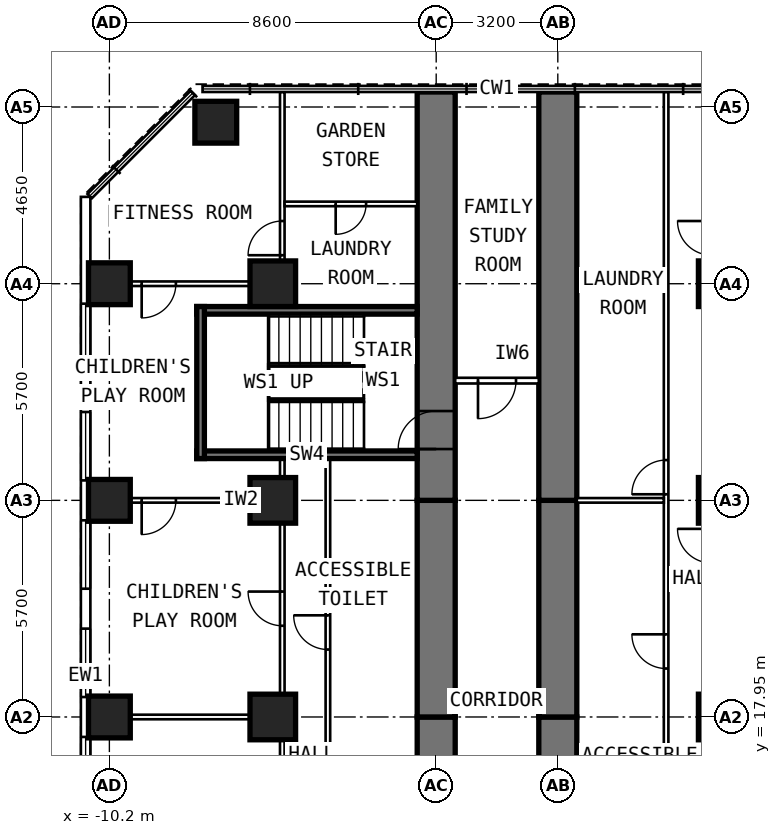
"""IFC4 building model, lengths in metres.
Left out: names, types, materials, properties, quantities, classifications, styles, units other than length and angle.
Written with IfcOpenShell. Run it as: python <this file> out.ifc"""

import sys

from ifc_helpers import new_model, si_unit, direction, frame, frame_2d, origin, origin_2d, place, context, subcontext, project, spatial, rectangle, extrude, element, fill, save


model = new_model("IFC4")
c1 = context("Model", 3, precision=1e-05, world=origin(), true_north=direction((0.0, 1.0)))
c2 = subcontext(c1, "Body", "Model", "MODEL_VIEW")
j1 = project(units=[si_unit("LENGTHUNIT", "METRE"), si_unit("PLANEANGLEUNIT", "RADIAN")], contexts=[c1])
p1 = place(None, origin())
s1 = spatial("IfcSite", under=j1, at=p1, CompositionType="ELEMENT")
p2 = place(p1, origin())
s2 = spatial("IfcBuilding", under=s1, at=p2, CompositionType="ELEMENT")
p3 = place(p2, frame((0.0, 0.0, 25.2)))
s3 = spatial("IfcBuildingStorey", under=s2, at=p3, CompositionType="ELEMENT", Elevation=25.2)
for number, where, z_axis, x_axis in (
    (1, (-10.2, 17.95, 0.0), (0.0, 0.0, 1.0), (0.0, 1.0, 0.0)),
    (2, (-10.2, 23.65, 0.0), (0.0, 0.0, 1.0), (0.0, 1.0, 0.0)),
    (3, (-10.2, 29.35, 0.0), (0.0, 0.0, 1.0), (0.0, 1.0, 0.0)),
    (4, (-7.4, 33.6, 0.0), (0.0, 0.0, 1.0), (0.0, 1.0, 0.0)),
):
    element("IfcColumn", number, at=place(p3, frame(where, z_axis=z_axis, x_axis=x_axis)), inside=s3, PredefinedType="COLUMN", context=c2, shape_type="SweptSolid", body=[
        extrude(rectangle(XDim=1.1, YDim=1.1, at=origin_2d()), origin(), (0.0, 0.0, 1.0), 3.6),
    ])
for number, where, z_axis, x_axis in (
    (5, (-5.9, 17.95, 0.0), (0.0, 0.0, 1.0), (0.0, 1.0, 0.0)),
    (6, (-5.9, 23.65, 0.0), (0.0, 0.0, 1.0), (0.0, 1.0, 0.0)),
    (7, (-5.9, 29.35, 0.0), (0.0, 0.0, 1.0), (0.0, 1.0, 0.0)),
    (8, (5.9, 17.95, 0.0), (0.0, 0.0, 1.0), (0.0, 1.0, 0.0)),
    (9, (5.9, 23.65, 0.0), (0.0, 0.0, 1.0), (0.0, 1.0, 0.0)),
    (10, (5.9, 29.35, 0.0), (0.0, 0.0, 1.0), (0.0, 1.0, 0.0)),
):
    element("IfcColumn", number, at=place(p3, frame(where, z_axis=z_axis, x_axis=x_axis)), inside=s3, PredefinedType="COLUMN", context=c2, shape_type="SweptSolid", body=[
        extrude(rectangle(XDim=1.2, YDim=1.2, at=origin_2d()), origin(), (0.0, 0.0, 1.0), 3.6),
    ])
p4 = place(p3, frame((-1.6, 9.6, 0.0), z_axis=(0.0, 0.0, 1.0), x_axis=(0.0, 1.0, 0.0)))
e11 = element("IfcWall", 11, at=p4, inside=s3, PredefinedType="SHEAR", context=c2, shape_type="SweptSolid", body=[
    extrude(rectangle(XDim=8.35, YDim=1.0, at=frame_2d((4.175, 0.0))), origin(), (0.0, 0.0, 1.0), 3.6),
])
p5 = place(p4, frame((1.3, 0.0, 0.0)))
e12 = element("IfcOpeningElement", 12, at=p5, cuts=e11, PredefinedType="OPENING", context=c2, shape_type="SweptSolid", body=[
    extrude(rectangle(XDim=1.0, YDim=2.1, at=frame_2d((0.5, 1.05))), frame((0.0, 0.512, 0.0), z_axis=(0.0, -1.0, 0.0), x_axis=(1.0, 0.0, 0.0)), (0.0, 0.0, 1.0), 1.024),
])
p6 = place(p3, frame((-1.6, 17.95, 0.0), z_axis=(0.0, 0.0, 1.0), x_axis=(0.0, 1.0, 0.0)))
e13 = element("IfcWall", 13, at=p6, inside=s3, PredefinedType="SHEAR", context=c2, shape_type="SweptSolid", body=[
    extrude(rectangle(XDim=5.7, YDim=1.0, at=frame_2d((2.85, 0.0))), origin(), (0.0, 0.0, 1.0), 3.6),
])
p7 = place(p3, frame((-1.6, 23.65, 0.0), z_axis=(0.0, 0.0, 1.0), x_axis=(0.0, 1.0, 0.0)))
e14 = element("IfcWall", 14, at=p7, inside=s3, PredefinedType="SHEAR", context=c2, shape_type="SweptSolid", body=[
    extrude(rectangle(XDim=10.745, YDim=1.0, at=frame_2d((5.373, 0.0))), origin(), (0.0, 0.0, 1.0), 3.6),
])
p8 = place(p7, frame((1.35, 0.0, 0.0)))
e15 = element("IfcOpeningElement", 15, at=p8, cuts=e14, PredefinedType="OPENING", context=c2, shape_type="SweptSolid", body=[
    extrude(rectangle(XDim=1.0, YDim=2.1, at=frame_2d((0.5, 1.05))), frame((0.0, 0.512, 0.0), z_axis=(0.0, -1.0, 0.0), x_axis=(1.0, 0.0, 0.0)), (0.0, 0.0, 1.0), 1.024),
])
p9 = place(p3, frame((1.6, 9.6, 0.0), z_axis=(0.0, 0.0, 1.0), x_axis=(0.0, 1.0, 0.0)))
e16 = element("IfcWall", 16, at=p9, inside=s3, PredefinedType="SHEAR", context=c2, shape_type="SweptSolid", body=[
    extrude(rectangle(XDim=8.35, YDim=1.0, at=frame_2d((4.175, 0.0))), origin(), (0.0, 0.0, 1.0), 3.6),
])
p10 = place(p9, frame((1.3, 0.0, 0.0)))
e17 = element("IfcOpeningElement", 17, at=p10, cuts=e16, PredefinedType="OPENING", context=c2, shape_type="SweptSolid", body=[
    extrude(rectangle(XDim=1.0, YDim=2.1, at=frame_2d((0.5, 1.05))), frame((0.0, 0.512, 0.0), z_axis=(0.0, -1.0, 0.0), x_axis=(1.0, 0.0, 0.0)), (0.0, 0.0, 1.0), 1.024),
])
p11 = place(p3, frame((1.6, 17.95, 0.0), z_axis=(0.0, 0.0, 1.0), x_axis=(0.0, 1.0, 0.0)))
e18 = element("IfcWall", 18, at=p11, inside=s3, PredefinedType="SHEAR", context=c2, shape_type="SweptSolid", body=[
    extrude(rectangle(XDim=5.7, YDim=1.0, at=frame_2d((2.85, 0.0))), origin(), (0.0, 0.0, 1.0), 3.6),
])
p12 = place(p3, frame((1.6, 23.65, 0.0), z_axis=(0.0, 0.0, 1.0), x_axis=(0.0, 1.0, 0.0)))
e19 = element("IfcWall", 19, at=p12, inside=s3, PredefinedType="SHEAR", context=c2, shape_type="SweptSolid", body=[
    extrude(rectangle(XDim=10.745, YDim=1.0, at=frame_2d((5.373, 0.0))), origin(), (0.0, 0.0, 1.0), 3.6),
])
p13 = place(p3, frame((-10.825, 6.409, 0.0), z_axis=(0.0, 0.0, 1.0), x_axis=(0.0, 1.0, 0.0)))
e20 = element("IfcWall", 20, at=p13, inside=s3, PredefinedType="SOLIDWALL", context=c2, shape_type="SweptSolid", body=[
    extrude(rectangle(XDim=25.226, YDim=0.25, at=frame_2d((12.613, 0.0))), origin(), (0.0, 0.0, 1.0), 3.35),
])
p14 = place(p13, frame((0.666, 0.0, 0.8)))
e21 = element("IfcOpeningElement", 21, at=p14, cuts=e20, PredefinedType="OPENING", context=c2, shape_type="SweptSolid", body=[
    extrude(rectangle(XDim=1.8, YDim=1.8, at=frame_2d((0.9, 0.9))), frame((0.0, 0.137, 0.0), z_axis=(0.0, -1.0, 0.0), x_axis=(1.0, 0.0, 0.0)), (0.0, 0.0, 1.0), 0.274),
])
p15 = place(p13, frame((3.516, 0.0, 0.8)))
e22 = element("IfcOpeningElement", 22, at=p15, cuts=e20, PredefinedType="OPENING", context=c2, shape_type="SweptSolid", body=[
    extrude(rectangle(XDim=1.8, YDim=1.8, at=frame_2d((0.9, 0.9))), frame((0.0, 0.137, 0.0), z_axis=(0.0, -1.0, 0.0), x_axis=(1.0, 0.0, 0.0)), (0.0, 0.0, 1.0), 0.274),
])
p16 = place(p13, frame((6.366, 0.0, 0.8)))
e23 = element("IfcOpeningElement", 23, at=p16, cuts=e20, PredefinedType="OPENING", context=c2, shape_type="SweptSolid", body=[
    extrude(rectangle(XDim=1.8, YDim=1.8, at=frame_2d((0.9, 0.9))), frame((0.0, 0.137, 0.0), z_axis=(0.0, -1.0, 0.0), x_axis=(1.0, 0.0, 0.0)), (0.0, 0.0, 1.0), 0.274),
])
p17 = place(p13, frame((9.216, 0.0, 0.8)))
e24 = element("IfcOpeningElement", 24, at=p17, cuts=e20, PredefinedType="OPENING", context=c2, shape_type="SweptSolid", body=[
    extrude(rectangle(XDim=1.8, YDim=1.8, at=frame_2d((0.9, 0.9))), frame((0.0, 0.137, 0.0), z_axis=(0.0, -1.0, 0.0), x_axis=(1.0, 0.0, 0.0)), (0.0, 0.0, 1.0), 0.274),
])
p18 = place(p13, frame((12.066, 0.0, 0.8)))
e25 = element("IfcOpeningElement", 25, at=p18, cuts=e20, PredefinedType="OPENING", context=c2, shape_type="SweptSolid", body=[
    extrude(rectangle(XDim=1.8, YDim=1.8, at=frame_2d((0.9, 0.9))), frame((0.0, 0.137, 0.0), z_axis=(0.0, -1.0, 0.0), x_axis=(1.0, 0.0, 0.0)), (0.0, 0.0, 1.0), 0.274),
])
p19 = place(p13, frame((14.916, 0.0, 0.8)))
e26 = element("IfcOpeningElement", 26, at=p19, cuts=e20, PredefinedType="OPENING", context=c2, shape_type="SweptSolid", body=[
    extrude(rectangle(XDim=1.8, YDim=1.8, at=frame_2d((0.9, 0.9))), frame((0.0, 0.137, 0.0), z_axis=(0.0, -1.0, 0.0), x_axis=(1.0, 0.0, 0.0)), (0.0, 0.0, 1.0), 0.274),
])
p20 = place(p13, frame((17.766, 0.0, 0.8)))
e27 = element("IfcOpeningElement", 27, at=p20, cuts=e20, PredefinedType="OPENING", context=c2, shape_type="SweptSolid", body=[
    extrude(rectangle(XDim=1.8, YDim=1.8, at=frame_2d((0.9, 0.9))), frame((0.0, 0.137, 0.0), z_axis=(0.0, -1.0, 0.0), x_axis=(1.0, 0.0, 0.0)), (0.0, 0.0, 1.0), 0.274),
])
p21 = place(p13, frame((20.616, 0.0, 0.8)))
e28 = element("IfcOpeningElement", 28, at=p21, cuts=e20, PredefinedType="OPENING", context=c2, shape_type="SweptSolid", body=[
    extrude(rectangle(XDim=1.8, YDim=1.8, at=frame_2d((0.9, 0.9))), frame((0.0, 0.137, 0.0), z_axis=(0.0, -1.0, 0.0), x_axis=(1.0, 0.0, 0.0)), (0.0, 0.0, 1.0), 0.274),
])
p22 = place(p3, frame((-4.45, 10.1, 0.0), z_axis=(0.0, 0.0, 1.0), x_axis=(0.0, 1.0, 0.0)))
e29 = element("IfcWall", 29, at=p22, inside=s3, PredefinedType="PARTITIONING", context=c2, shape_type="SweptSolid", body=[
    extrude(rectangle(XDim=14.65, YDim=0.12, at=frame_2d((7.325, 0.0))), origin(), (0.0, 0.0, 1.0), 3.35),
])
p23 = place(p22, frame((2.9, 0.0, 0.0)))
e30 = element("IfcOpeningElement", 30, at=p23, cuts=e29, PredefinedType="OPENING", context=c2, shape_type="SweptSolid", body=[
    extrude(rectangle(XDim=0.9, YDim=2.1, at=frame_2d((0.45, 1.05))), frame((0.0, 0.072, 0.0), z_axis=(0.0, -1.0, 0.0), x_axis=(1.0, 0.0, 0.0)), (0.0, 0.0, 1.0), 0.144),
])
p24 = place(p22, frame((9.625, 0.0, 0.0)))
e31 = element("IfcOpeningElement", 31, at=p24, cuts=e29, PredefinedType="OPENING", context=c2, shape_type="SweptSolid", body=[
    extrude(rectangle(XDim=0.9, YDim=2.1, at=frame_2d((0.45, 1.05))), frame((0.0, 0.072, 0.0), z_axis=(0.0, -1.0, 0.0), x_axis=(1.0, 0.0, 0.0)), (0.0, 0.0, 1.0), 0.144),
])
p25 = place(p3, frame((-5.65, 9.6, 0.0), z_axis=(0.0, 0.0, 1.0), x_axis=(0.0, 1.0, 0.0)))
e32 = element("IfcWall", 32, at=p25, inside=s3, PredefinedType="PARTITIONING", context=c2, shape_type="SweptSolid", body=[
    extrude(rectangle(XDim=15.15, YDim=0.12, at=frame_2d((7.575, 0.0))), origin(), (0.0, 0.0, 1.0), 3.35),
])
p26 = place(p25, frame((3.925, 0.0, 0.0)))
e33 = element("IfcOpeningElement", 33, at=p26, cuts=e32, PredefinedType="OPENING", context=c2, shape_type="SweptSolid", body=[
    extrude(rectangle(XDim=0.9, YDim=2.1, at=frame_2d((0.45, 1.05))), frame((0.0, 0.072, 0.0), z_axis=(0.0, -1.0, 0.0), x_axis=(1.0, 0.0, 0.0)), (0.0, 0.0, 1.0), 0.144),
])
p27 = place(p25, frame((10.75, 0.0, 0.0)))
e34 = element("IfcOpeningElement", 34, at=p27, cuts=e32, PredefinedType="OPENING", context=c2, shape_type="SweptSolid", body=[
    extrude(rectangle(XDim=0.9, YDim=2.1, at=frame_2d((0.45, 1.05))), frame((0.0, 0.072, 0.0), z_axis=(0.0, -1.0, 0.0), x_axis=(1.0, 0.0, 0.0)), (0.0, 0.0, 1.0), 0.144),
])
p28 = place(p3, frame((-5.71, 17.95, 0.0), z_axis=(0.0, 0.0, 1.0), x_axis=(-1.0, 0.0, 0.0)))
e35 = element("IfcWall", 35, at=p28, inside=s3, PredefinedType="PARTITIONING", context=c2, shape_type="SweptSolid", body=[
    extrude(rectangle(XDim=4.99, YDim=0.12, at=frame_2d((2.495, 0.0))), origin(), (0.0, 0.0, 1.0), 2.45),
])
p29 = place(p3, frame((-5.71, 23.65, 0.0), z_axis=(0.0, 0.0, 1.0), x_axis=(-1.0, 0.0, 0.0)))
e36 = element("IfcWall", 36, at=p29, inside=s3, PredefinedType="PARTITIONING", context=c2, shape_type="SweptSolid", body=[
    extrude(rectangle(XDim=4.99, YDim=0.12, at=frame_2d((2.495, 0.0))), origin(), (0.0, 0.0, 1.0), 2.45),
])
p30 = place(p29, frame((2.74, 0.0, 0.0)))
e37 = element("IfcOpeningElement", 37, at=p30, cuts=e36, PredefinedType="OPENING", context=c2, shape_type="SweptSolid", body=[
    extrude(rectangle(XDim=0.9, YDim=2.1, at=frame_2d((0.45, 1.05))), frame((0.0, 0.072, 0.0), z_axis=(0.0, -1.0, 0.0), x_axis=(1.0, 0.0, 0.0)), (0.0, 0.0, 1.0), 0.144),
])
p31 = place(p3, frame((-5.71, 29.35, 0.0), z_axis=(0.0, 0.0, 1.0), x_axis=(-1.0, 0.0, 0.0)))
e38 = element("IfcWall", 38, at=p31, inside=s3, PredefinedType="PARTITIONING", context=c2, shape_type="SweptSolid", body=[
    extrude(rectangle(XDim=4.99, YDim=0.12, at=frame_2d((2.495, 0.0))), origin(), (0.0, 0.0, 1.0), 2.45),
])
p32 = place(p31, frame((2.74, 0.0, 0.0)))
e39 = element("IfcOpeningElement", 39, at=p32, cuts=e38, PredefinedType="OPENING", context=c2, shape_type="SweptSolid", body=[
    extrude(rectangle(XDim=0.9, YDim=2.1, at=frame_2d((0.45, 1.05))), frame((0.0, 0.072, 0.0), z_axis=(0.0, -1.0, 0.0), x_axis=(1.0, 0.0, 0.0)), (0.0, 0.0, 1.0), 0.144),
])
p33 = place(p3, frame((-5.65, 28.95, 0.0), z_axis=(0.0, 0.0, 1.0), x_axis=(0.0, 1.0, 0.0)))
e40 = element("IfcWall", 40, at=p33, inside=s3, PredefinedType="PARTITIONING", context=c2, shape_type="SweptSolid", body=[
    extrude(rectangle(XDim=5.445, YDim=0.12, at=frame_2d((2.723, 0.0))), origin(), (0.0, 0.0, 1.0), 3.35),
])
p34 = place(p33, frame((1.15, 0.0, 0.0)))
e41 = element("IfcOpeningElement", 41, at=p34, cuts=e40, PredefinedType="OPENING", context=c2, shape_type="SweptSolid", body=[
    extrude(rectangle(XDim=0.9, YDim=2.1, at=frame_2d((0.45, 1.05))), frame((0.0, 0.072, 0.0), z_axis=(0.0, -1.0, 0.0), x_axis=(1.0, 0.0, 0.0)), (0.0, 0.0, 1.0), 0.144),
])
p35 = place(p3, frame((-2.1, 31.45, 0.0), z_axis=(0.0, 0.0, 1.0), x_axis=(-1.0, 0.0, 0.0)))
e42 = element("IfcWall", 42, at=p35, inside=s3, PredefinedType="PARTITIONING", context=c2, shape_type="SweptSolid", body=[
    extrude(rectangle(XDim=3.49, YDim=0.12, at=frame_2d((1.745, 0.0))), origin(), (0.0, 0.0, 1.0), 3.35),
])
p36 = place(p35, frame((1.345, 0.0, 0.0)))
e43 = element("IfcOpeningElement", 43, at=p36, cuts=e42, PredefinedType="OPENING", context=c2, shape_type="SweptSolid", body=[
    extrude(rectangle(XDim=0.8, YDim=2.1, at=frame_2d((0.4, 1.05))), frame((0.0, 0.072, 0.0), z_axis=(0.0, -1.0, 0.0), x_axis=(1.0, 0.0, 0.0)), (0.0, 0.0, 1.0), 0.144),
])
p37 = place(p3, frame((4.45, 10.1, 0.0), z_axis=(0.0, 0.0, 1.0), x_axis=(0.0, 1.0, 0.0)))
e44 = element("IfcWall", 44, at=p37, inside=s3, PredefinedType="PARTITIONING", context=c2, shape_type="SweptSolid", body=[
    extrude(rectangle(XDim=24.295, YDim=0.12, at=frame_2d((12.147, 0.0))), origin(), (0.0, 0.0, 1.0), 3.35),
])
p38 = place(p37, frame((2.9, 0.0, 0.0)))
e45 = element("IfcOpeningElement", 45, at=p38, cuts=e44, PredefinedType="OPENING", context=c2, shape_type="SweptSolid", body=[
    extrude(rectangle(XDim=0.9, YDim=2.1, at=frame_2d((0.45, 1.05))), frame((0.0, 0.072, 0.0), z_axis=(0.0, -1.0, 0.0), x_axis=(1.0, 0.0, 0.0)), (0.0, 0.0, 1.0), 0.144),
])
p39 = place(p37, frame((9.125, 0.0, 0.0)))
e46 = element("IfcOpeningElement", 46, at=p39, cuts=e44, PredefinedType="OPENING", context=c2, shape_type="SweptSolid", body=[
    extrude(rectangle(XDim=0.9, YDim=2.1, at=frame_2d((0.45, 1.05))), frame((0.0, 0.072, 0.0), z_axis=(0.0, -1.0, 0.0), x_axis=(1.0, 0.0, 0.0)), (0.0, 0.0, 1.0), 0.144),
])
p40 = place(p37, frame((13.71, 0.0, 0.0)))
e47 = element("IfcOpeningElement", 47, at=p40, cuts=e44, PredefinedType="OPENING", context=c2, shape_type="SweptSolid", body=[
    extrude(rectangle(XDim=0.9, YDim=2.1, at=frame_2d((0.45, 1.05))), frame((0.0, 0.072, 0.0), z_axis=(0.0, -1.0, 0.0), x_axis=(1.0, 0.0, 0.0)), (0.0, 0.0, 1.0), 0.144),
])
p41 = place(p3, frame((2.1, 23.65, 0.0), z_axis=(0.0, 0.0, 1.0), x_axis=(1.0, 0.0, 0.0)))
e48 = element("IfcWall", 48, at=p41, inside=s3, PredefinedType="PARTITIONING", context=c2, shape_type="SweptSolid", body=[
    extrude(rectangle(XDim=2.29, YDim=0.12, at=frame_2d((1.145, 0.0))), origin(), (0.0, 0.0, 1.0), 2.45),
])
p42 = place(p3, frame((1.1, 26.8, 0.0), z_axis=(0.0, 0.0, 1.0), x_axis=(-1.0, 0.0, 0.0)))
e49 = element("IfcWall", 49, at=p42, inside=s3, PredefinedType="PARTITIONING", context=c2, shape_type="SweptSolid", body=[
    extrude(rectangle(XDim=2.2, YDim=0.15, at=frame_2d((1.1, 0.0))), origin(), (0.0, 0.0, 1.0), 3.35),
])
p43 = place(p42, frame((0.6, 0.0, 0.0)))
e50 = element("IfcOpeningElement", 50, at=p43, cuts=e49, PredefinedType="OPENING", context=c2, shape_type="SweptSolid", body=[
    extrude(rectangle(XDim=1.0, YDim=2.1, at=frame_2d((0.5, 1.05))), frame((0.0, 0.087, 0.0), z_axis=(0.0, -1.0, 0.0), x_axis=(1.0, 0.0, 0.0)), (0.0, 0.0, 1.0), 0.174),
])
for number, where, z_axis, x_axis in (
    (51, (-2.1, 24.85, 0.0), (0.0, 0.0, 1.0), (-1.0, 0.0, 0.0)),
    (52, (-2.1, 28.65, 0.0), (0.0, 0.0, 1.0), (-1.0, 0.0, 0.0)),
):
    element("IfcWall", number, at=place(p3, frame(where, z_axis=z_axis, x_axis=x_axis)), inside=s3, PredefinedType="SHEAR", context=c2, shape_type="SweptSolid", body=[
        extrude(rectangle(XDim=5.8, YDim=0.2, at=frame_2d((2.9, 0.0))), origin(), (0.0, 0.0, 1.0), 3.33),
    ])
p44 = place(p3, frame((-7.8, 24.75, 0.0), z_axis=(0.0, 0.0, 1.0), x_axis=(0.0, 1.0, 0.0)))
e53 = element("IfcWall", 53, at=p44, inside=s3, PredefinedType="SHEAR", context=c2, shape_type="SweptSolid", body=[
    extrude(rectangle(XDim=4.0, YDim=0.2, at=frame_2d((2.0, 0.0))), origin(), (0.0, 0.0, 1.0), 3.33),
])
p45 = place(p17, origin())
e54 = element("IfcWindow", 54, at=p45, inside=s3, PartitioningType="SINGLE_PANEL", PredefinedType="WINDOW", context=c2, shape_type="SweptSolid", body=[
    extrude(rectangle(XDim=1.8, YDim=1.8, at=frame_2d((0.9, 0.9))), frame((0.0, 0.03, 0.0), z_axis=(0.0, -1.0, 0.0), x_axis=(1.0, 0.0, 0.0)), (0.0, 0.0, 1.0), 0.06),
])
fill(e24, e54)
p46 = place(p18, origin())
e55 = element("IfcWindow", 55, at=p46, inside=s3, PartitioningType="SINGLE_PANEL", PredefinedType="WINDOW", context=c2, shape_type="SweptSolid", body=[
    extrude(rectangle(XDim=1.8, YDim=1.8, at=frame_2d((0.9, 0.9))), frame((0.0, 0.03, 0.0), z_axis=(0.0, -1.0, 0.0), x_axis=(1.0, 0.0, 0.0)), (0.0, 0.0, 1.0), 0.06),
])
fill(e25, e55)
p47 = place(p19, origin())
e56 = element("IfcWindow", 56, at=p47, inside=s3, PartitioningType="SINGLE_PANEL", PredefinedType="WINDOW", context=c2, shape_type="SweptSolid", body=[
    extrude(rectangle(XDim=1.8, YDim=1.8, at=frame_2d((0.9, 0.9))), frame((0.0, 0.03, 0.0), z_axis=(0.0, -1.0, 0.0), x_axis=(1.0, 0.0, 0.0)), (0.0, 0.0, 1.0), 0.06),
])
fill(e26, e56)
p48 = place(p20, origin())
e57 = element("IfcWindow", 57, at=p48, inside=s3, PartitioningType="SINGLE_PANEL", PredefinedType="WINDOW", context=c2, shape_type="SweptSolid", body=[
    extrude(rectangle(XDim=1.8, YDim=1.8, at=frame_2d((0.9, 0.9))), frame((0.0, 0.03, 0.0), z_axis=(0.0, -1.0, 0.0), x_axis=(1.0, 0.0, 0.0)), (0.0, 0.0, 1.0), 0.06),
])
fill(e27, e57)
p49 = place(p21, origin())
e58 = element("IfcWindow", 58, at=p49, inside=s3, PartitioningType="SINGLE_PANEL", PredefinedType="WINDOW", context=c2, shape_type="SweptSolid", body=[
    extrude(rectangle(XDim=1.8, YDim=1.8, at=frame_2d((0.9, 0.9))), frame((0.0, 0.03, 0.0), z_axis=(0.0, -1.0, 0.0), x_axis=(1.0, 0.0, 0.0)), (0.0, 0.0, 1.0), 0.06),
])
fill(e28, e58)
p50 = place(p27, origin())
e59 = element("IfcDoor", 59, at=p50, inside=s3, OperationType="SINGLE_SWING_RIGHT", PredefinedType="DOOR", context=c2, shape_type="SweptSolid", body=[
    extrude(rectangle(XDim=0.9, YDim=2.1, at=frame_2d((0.45, 1.05))), frame((0.0, 0.025, 0.0), z_axis=(0.0, -1.0, 0.0), x_axis=(1.0, 0.0, 0.0)), (0.0, 0.0, 1.0), 0.05),
])
fill(e34, e59)
p51 = place(p24, origin())
e60 = element("IfcDoor", 60, at=p51, inside=s3, OperationType="SINGLE_SWING_RIGHT", PredefinedType="DOOR", context=c2, shape_type="SweptSolid", body=[
    extrude(rectangle(XDim=0.9, YDim=2.1, at=frame_2d((0.45, 1.05))), frame((0.0, 0.025, 0.0), z_axis=(0.0, -1.0, 0.0), x_axis=(1.0, 0.0, 0.0)), (0.0, 0.0, 1.0), 0.05),
])
fill(e31, e60)
p52 = place(p32, origin())
e61 = element("IfcDoor", 61, at=p52, inside=s3, OperationType="SINGLE_SWING_RIGHT", PredefinedType="DOOR", context=c2, shape_type="SweptSolid", body=[
    extrude(rectangle(XDim=0.9, YDim=2.1, at=frame_2d((0.45, 1.05))), frame((0.0, 0.025, 0.0), z_axis=(0.0, -1.0, 0.0), x_axis=(1.0, 0.0, 0.0)), (0.0, 0.0, 1.0), 0.05),
])
fill(e39, e61)
p53 = place(p34, origin())
e62 = element("IfcDoor", 62, at=p53, inside=s3, OperationType="SINGLE_SWING_LEFT", PredefinedType="DOOR", context=c2, shape_type="SweptSolid", body=[
    extrude(rectangle(XDim=0.9, YDim=2.1, at=frame_2d((0.45, 1.05))), frame((0.0, 0.025, 0.0), z_axis=(0.0, -1.0, 0.0), x_axis=(1.0, 0.0, 0.0)), (0.0, 0.0, 1.0), 0.05),
])
fill(e41, e62)
p54 = place(p36, origin())
e63 = element("IfcDoor", 63, at=p54, inside=s3, OperationType="SINGLE_SWING_RIGHT", PredefinedType="DOOR", context=c2, shape_type="SweptSolid", body=[
    extrude(rectangle(XDim=0.8, YDim=2.1, at=frame_2d((0.4, 1.05))), frame((0.0, 0.025, 0.0), z_axis=(0.0, -1.0, 0.0), x_axis=(1.0, 0.0, 0.0)), (0.0, 0.0, 1.0), 0.05),
])
fill(e43, e63)
p55 = place(p30, origin())
e64 = element("IfcDoor", 64, at=p55, inside=s3, OperationType="SINGLE_SWING_RIGHT", PredefinedType="DOOR", context=c2, shape_type="SweptSolid", body=[
    extrude(rectangle(XDim=0.9, YDim=2.1, at=frame_2d((0.45, 1.05))), frame((0.0, 0.025, 0.0), z_axis=(0.0, -1.0, 0.0), x_axis=(1.0, 0.0, 0.0)), (0.0, 0.0, 1.0), 0.05),
])
fill(e37, e64)
p56 = place(p39, origin())
e65 = element("IfcDoor", 65, at=p56, inside=s3, OperationType="SINGLE_SWING_RIGHT", PredefinedType="DOOR", context=c2, shape_type="SweptSolid", body=[
    extrude(rectangle(XDim=0.9, YDim=2.1, at=frame_2d((0.45, 1.05))), frame((0.0, 0.025, 0.0), z_axis=(0.0, -1.0, 0.0), x_axis=(1.0, 0.0, 0.0)), (0.0, 0.0, 1.0), 0.05),
])
fill(e46, e65)
p57 = place(p40, origin())
e66 = element("IfcDoor", 66, at=p57, inside=s3, OperationType="SINGLE_SWING_LEFT", PredefinedType="DOOR", context=c2, shape_type="SweptSolid", body=[
    extrude(rectangle(XDim=0.9, YDim=2.1, at=frame_2d((0.45, 1.05))), frame((0.0, 0.025, 0.0), z_axis=(0.0, -1.0, 0.0), x_axis=(1.0, 0.0, 0.0)), (0.0, 0.0, 1.0), 0.05),
])
fill(e47, e66)
p58 = place(p43, origin())
e67 = element("IfcDoor", 67, at=p58, inside=s3, OperationType="SINGLE_SWING_RIGHT", PredefinedType="DOOR", context=c2, shape_type="SweptSolid", body=[
    extrude(rectangle(XDim=1.0, YDim=2.1, at=frame_2d((0.5, 1.05))), frame((0.0, 0.025, 0.0), z_axis=(0.0, -1.0, 0.0), x_axis=(1.0, 0.0, 0.0)), (0.0, 0.0, 1.0), 0.05),
])
fill(e50, e67)
p59 = place(p8, origin())
e68 = element("IfcDoor", 68, at=p59, inside=s3, OperationType="SINGLE_SWING_LEFT", PredefinedType="DOOR", context=c2, shape_type="SweptSolid", body=[
    extrude(rectangle(XDim=1.0, YDim=2.1, at=frame_2d((0.5, 1.05))), frame((0.0, 0.25, 0.0), z_axis=(0.0, -1.0, 0.0), x_axis=(1.0, 0.0, 0.0)), (0.0, 0.0, 1.0), 0.5),
])
fill(e15, e68)
save(model, sys.argv[1])
